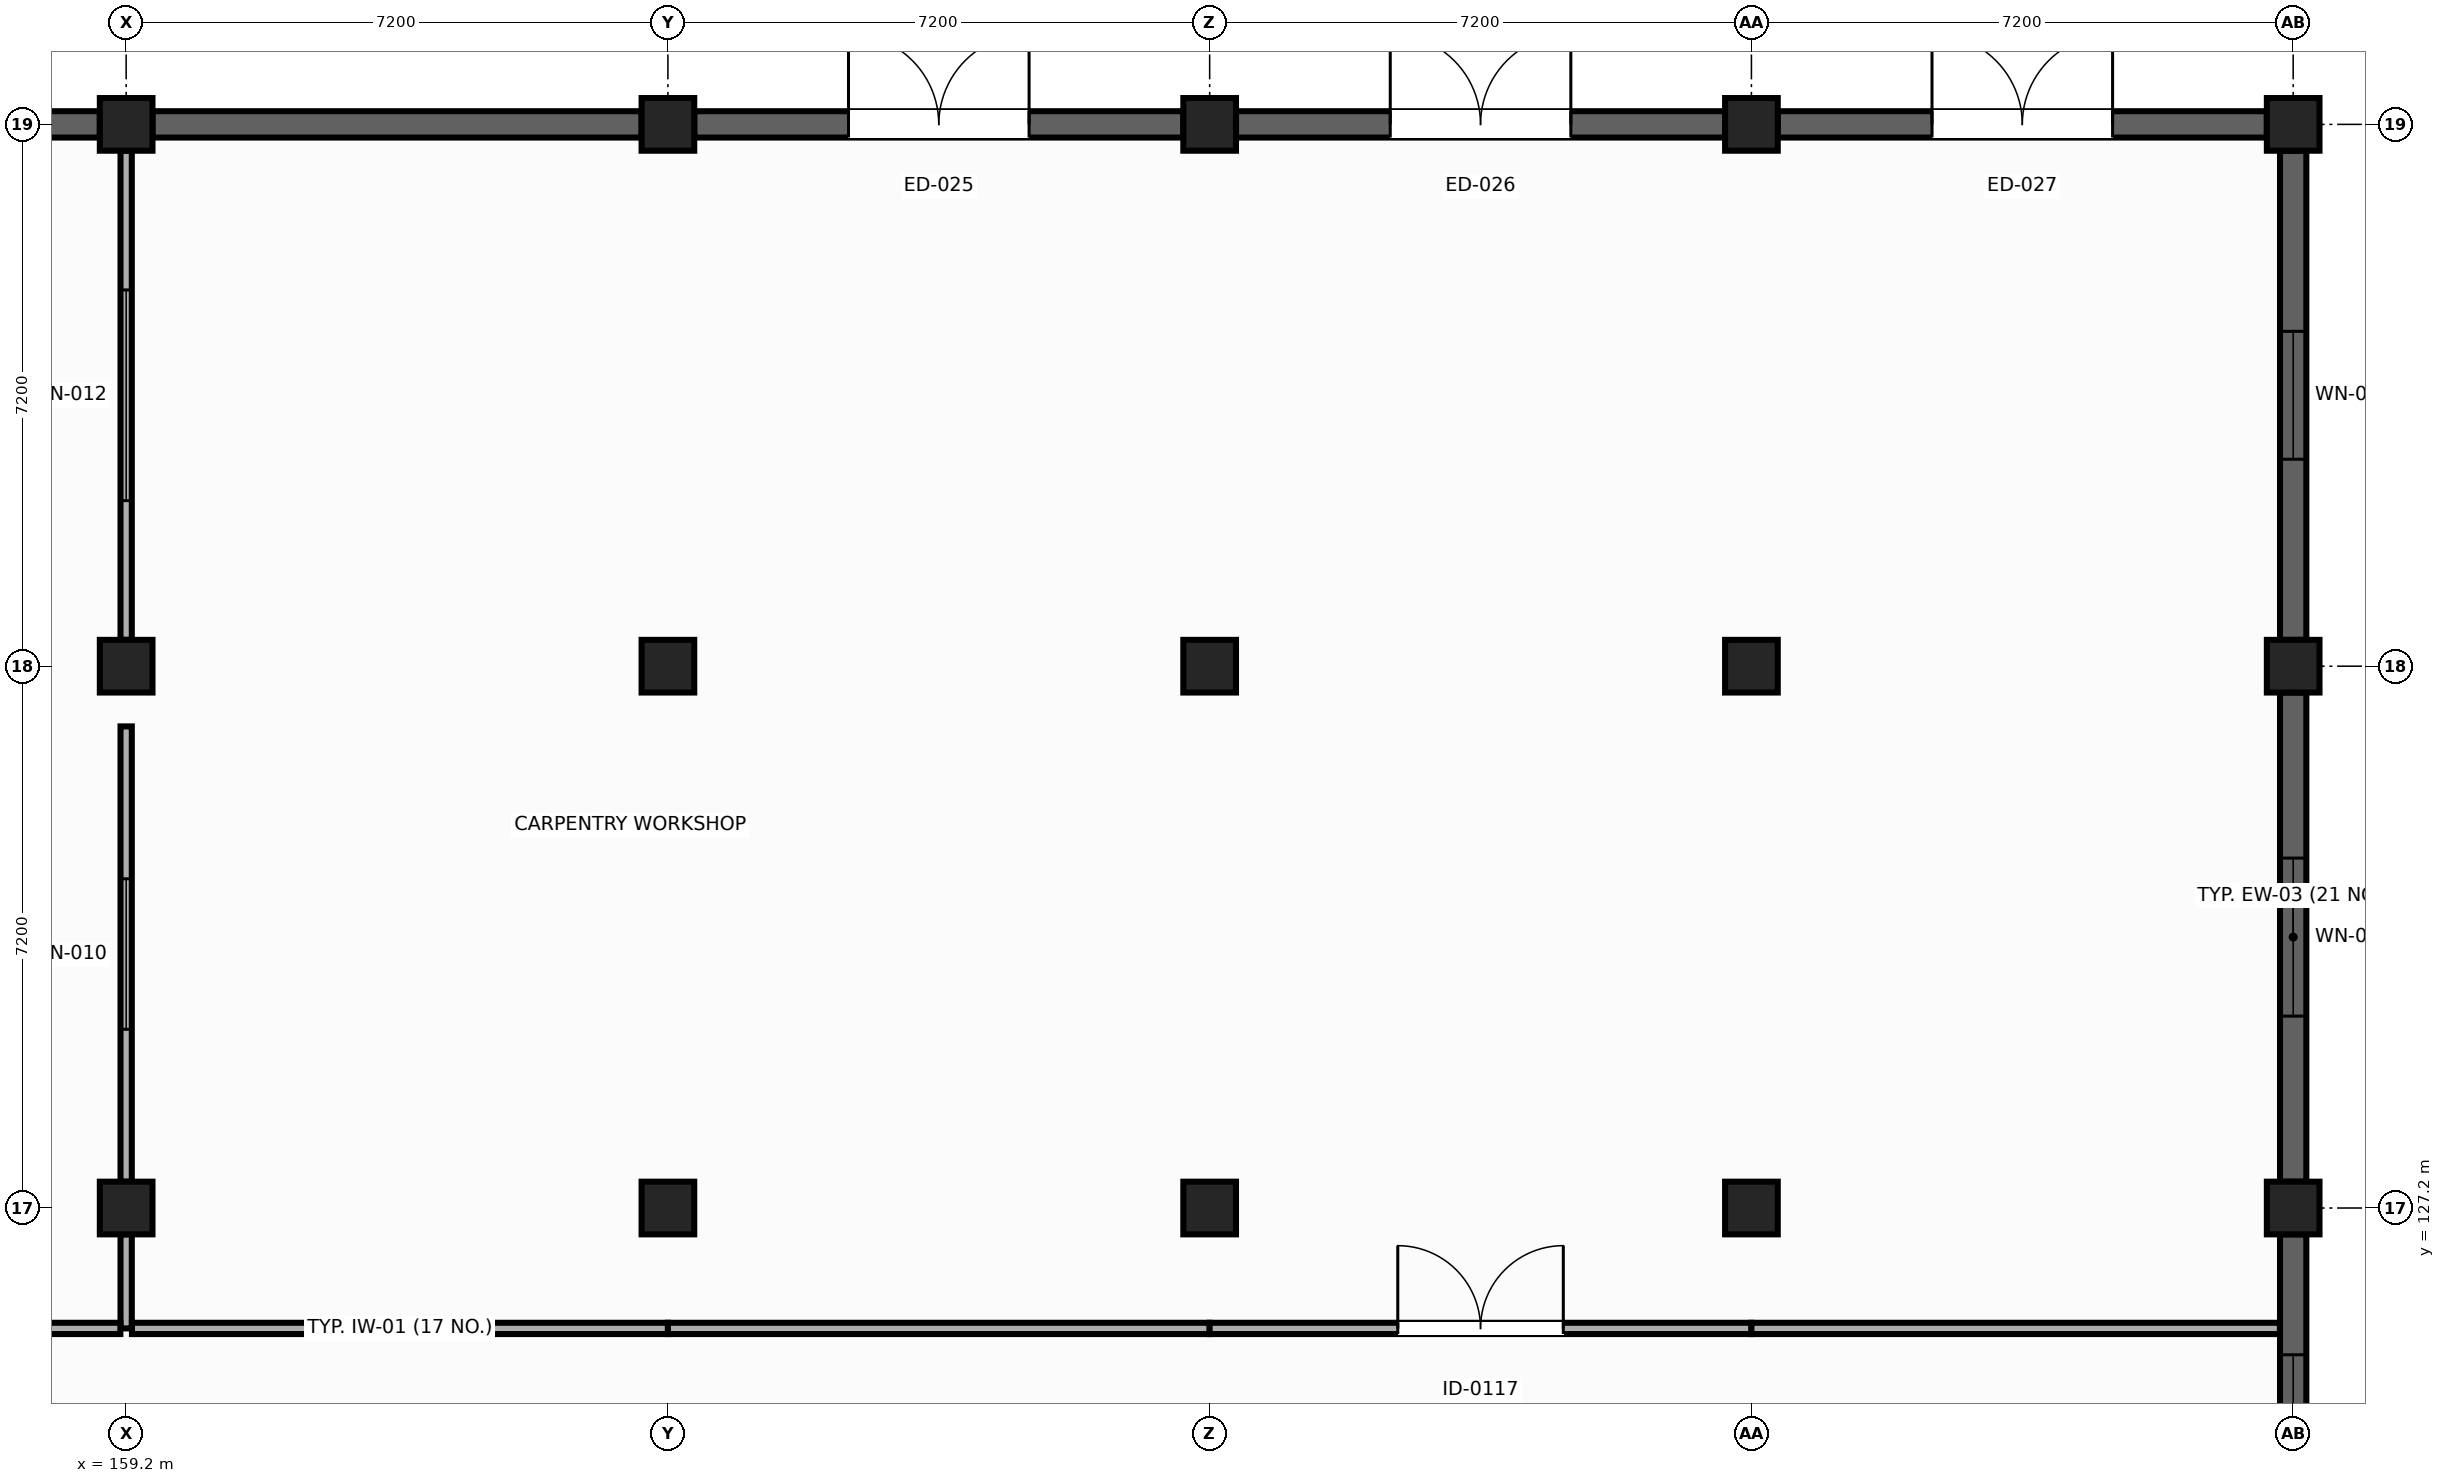
"""IFC4 building model, lengths in metres.
Left out: names, types, materials, properties, quantities, classifications, styles, units other than length and angle.
Written with IfcOpenShell. Run it as: python <this file> out.ifc"""

import sys

from ifc_helpers import new_model, si_unit, direction, frame, frame_2d, origin, origin_2d, place, context, subcontext, project, spatial, rectangle, extrude, element, fill, save


model = new_model("IFC4")
c1 = context("Model", 3, precision=1e-05, world=origin(), true_north=direction((0.0, 1.0)))
c2 = subcontext(c1, "Body", "Model", "MODEL_VIEW")
j1 = project(units=[si_unit("LENGTHUNIT", "METRE"), si_unit("PLANEANGLEUNIT", "RADIAN")], contexts=[c1])
p1 = place(None, origin())
s1 = spatial("IfcSite", under=j1, at=p1, CompositionType="ELEMENT")
p2 = place(p1, origin())
s2 = spatial("IfcBuilding", under=s1, at=p2, CompositionType="ELEMENT")
p3 = place(p2, origin())
s3 = spatial("IfcBuildingStorey", under=s2, at=p3, CompositionType="ELEMENT", Elevation=0.0)
for number, where, z_axis, x_axis in (
    (1, (159.2, 127.2, 0.0), (0.0, 0.0, 1.0), (1.0, 0.0, 0.0)),
    (2, (166.4, 127.2, 0.0), (0.0, 0.0, 1.0), (0.0, 1.0, 0.0)),
    (3, (173.6, 127.2, 0.0), (0.0, 0.0, 1.0), (1.0, 0.0, 0.0)),
    (4, (180.8, 127.2, 0.0), (0.0, 0.0, 1.0), (1.0, 0.0, 0.0)),
    (5, (188.0, 127.2, 0.0), (0.0, 0.0, 1.0), (0.0, 1.0, 0.0)),
    (6, (159.2, 134.4, 0.0), (0.0, 0.0, 1.0), (0.0, 1.0, 0.0)),
    (7, (166.4, 134.4, 0.0), (0.0, 0.0, 1.0), (1.0, 0.0, 0.0)),
    (8, (173.6, 134.4, 0.0), (0.0, 0.0, 1.0), (1.0, 0.0, 0.0)),
    (9, (180.8, 134.4, 0.0), (0.0, 0.0, 1.0), (0.0, 1.0, 0.0)),
    (10, (188.0, 134.4, 0.0), (0.0, 0.0, 1.0), (1.0, 0.0, 0.0)),
    (11, (159.2, 141.6, 0.0), (0.0, 0.0, 1.0), (1.0, 0.0, 0.0)),
    (12, (166.4, 141.6, 0.0), (0.0, 0.0, 1.0), (1.0, 0.0, 0.0)),
    (13, (173.6, 141.6, 0.0), (0.0, 0.0, 1.0), (0.0, 1.0, 0.0)),
    (14, (180.8, 141.6, 0.0), (0.0, 0.0, 1.0), (1.0, 0.0, 0.0)),
    (15, (188.0, 141.6, 0.0), (0.0, 0.0, 1.0), (0.0, 1.0, 0.0)),
):
    element("IfcColumn", number, at=place(p3, frame(where, z_axis=z_axis, x_axis=x_axis)), inside=s3, PredefinedType="COLUMN", context=c2, shape_type="SweptSolid", body=[
        extrude(rectangle(XDim=0.7, YDim=0.7, at=origin_2d()), origin(), (0.0, 0.0, 1.0), 5.4),
    ])
p4 = place(p3, frame((152.35, 141.6, 0.0), z_axis=(0.0, 0.0, 1.0), x_axis=(1.0, 0.0, 0.0)))
e16 = element("IfcWall", 16, at=p4, inside=s3, PredefinedType="SOLIDWALL", context=c2, shape_type="SweptSolid", body=[
    extrude(rectangle(XDim=6.5, YDim=0.35, at=frame_2d((3.25, 0.0))), origin(), (0.0, 0.0, 1.0), 5.12),
])
p5 = place(p4, frame((2.0, 0.0, 0.9)))
e17 = element("IfcOpeningElement", 17, at=p5, cuts=e16, PredefinedType="OPENING", context=c2, shape_type="SweptSolid", body=[
    extrude(rectangle(XDim=1.3, YDim=1.6, at=frame_2d((0.65, 0.8))), frame((0.0, 0.185, 0.0), z_axis=(0.0, -1.0, 0.0), x_axis=(1.0, 0.0, 0.0)), (0.0, 0.0, 1.0), 0.37),
])
p6 = place(p3, frame((159.55, 141.6, 0.0), z_axis=(0.0, 0.0, 1.0), x_axis=(1.0, 0.0, 0.0)))
e18 = element("IfcWall", 18, at=p6, inside=s3, PredefinedType="SOLIDWALL", context=c2, shape_type="SweptSolid", body=[
    extrude(rectangle(XDim=6.5, YDim=0.35, at=frame_2d((3.25, 0.0))), origin(), (0.0, 0.0, 1.0), 5.12),
])
p7 = place(p3, frame((166.75, 141.6, 0.0), z_axis=(0.0, 0.0, 1.0), x_axis=(1.0, 0.0, 0.0)))
e19 = element("IfcWall", 19, at=p7, inside=s3, PredefinedType="SOLIDWALL", context=c2, shape_type="SweptSolid", body=[
    extrude(rectangle(XDim=6.5, YDim=0.35, at=frame_2d((3.25, 0.0))), origin(), (0.0, 0.0, 1.0), 5.12),
])
p8 = place(p7, frame((2.05, 0.0, 0.0)))
e20 = element("IfcOpeningElement", 20, at=p8, cuts=e19, PredefinedType="OPENING", context=c2, shape_type="SweptSolid", body=[
    extrude(rectangle(XDim=2.4, YDim=2.7, at=frame_2d((1.2, 1.35))), frame((0.0, 0.185, 0.0), z_axis=(0.0, -1.0, 0.0), x_axis=(1.0, 0.0, 0.0)), (0.0, 0.0, 1.0), 0.37),
])
p9 = place(p3, frame((173.95, 141.6, 0.0), z_axis=(0.0, 0.0, 1.0), x_axis=(1.0, 0.0, 0.0)))
e21 = element("IfcWall", 21, at=p9, inside=s3, PredefinedType="SOLIDWALL", context=c2, shape_type="SweptSolid", body=[
    extrude(rectangle(XDim=6.5, YDim=0.35, at=frame_2d((3.25, 0.0))), origin(), (0.0, 0.0, 1.0), 5.12),
])
p10 = place(p9, frame((2.05, 0.0, 0.0)))
e22 = element("IfcOpeningElement", 22, at=p10, cuts=e21, PredefinedType="OPENING", context=c2, shape_type="SweptSolid", body=[
    extrude(rectangle(XDim=2.4, YDim=2.7, at=frame_2d((1.2, 1.35))), frame((0.0, 0.185, 0.0), z_axis=(0.0, -1.0, 0.0), x_axis=(1.0, 0.0, 0.0)), (0.0, 0.0, 1.0), 0.37),
])
p11 = place(p3, frame((181.15, 141.6, 0.0), z_axis=(0.0, 0.0, 1.0), x_axis=(1.0, 0.0, 0.0)))
e23 = element("IfcWall", 23, at=p11, inside=s3, PredefinedType="SOLIDWALL", context=c2, shape_type="SweptSolid", body=[
    extrude(rectangle(XDim=6.5, YDim=0.35, at=frame_2d((3.25, 0.0))), origin(), (0.0, 0.0, 1.0), 5.12),
])
p12 = place(p11, frame((2.05, 0.0, 0.0)))
e24 = element("IfcOpeningElement", 24, at=p12, cuts=e23, PredefinedType="OPENING", context=c2, shape_type="SweptSolid", body=[
    extrude(rectangle(XDim=2.4, YDim=2.7, at=frame_2d((1.2, 1.35))), frame((0.0, 0.185, 0.0), z_axis=(0.0, -1.0, 0.0), x_axis=(1.0, 0.0, 0.0)), (0.0, 0.0, 1.0), 0.37),
])
p13 = place(p3, frame((188.0, 141.25, 0.0), z_axis=(0.0, 0.0, 1.0), x_axis=(0.0, -1.0, 0.0)))
e25 = element("IfcWall", 25, at=p13, inside=s3, PredefinedType="SOLIDWALL", context=c2, shape_type="SweptSolid", body=[
    extrude(rectangle(XDim=6.5, YDim=0.35, at=frame_2d((3.25, 0.0))), origin(), (0.0, 0.0, 1.0), 5.12),
])
p14 = place(p13, frame((2.4, 0.0, 0.9)))
e26 = element("IfcOpeningElement", 26, at=p14, cuts=e25, PredefinedType="OPENING", context=c2, shape_type="SweptSolid", body=[
    extrude(rectangle(XDim=1.7, YDim=1.6, at=frame_2d((0.85, 0.8))), frame((0.0, 0.185, 0.0), z_axis=(0.0, -1.0, 0.0), x_axis=(1.0, 0.0, 0.0)), (0.0, 0.0, 1.0), 0.37),
])
p15 = place(p3, frame((188.0, 134.05, 0.0), z_axis=(0.0, 0.0, 1.0), x_axis=(0.0, -1.0, 0.0)))
e27 = element("IfcWall", 27, at=p15, inside=s3, PredefinedType="SOLIDWALL", context=c2, shape_type="SweptSolid", body=[
    extrude(rectangle(XDim=6.5, YDim=0.35, at=frame_2d((3.25, 0.0))), origin(), (0.0, 0.0, 1.0), 5.12),
])
p16 = place(p15, frame((2.2, 0.0, 0.9)))
e28 = element("IfcOpeningElement", 28, at=p16, cuts=e27, PredefinedType="OPENING", context=c2, shape_type="SweptSolid", body=[
    extrude(rectangle(XDim=2.1, YDim=1.6, at=frame_2d((1.05, 0.8))), frame((0.0, 0.185, 0.0), z_axis=(0.0, -1.0, 0.0), x_axis=(1.0, 0.0, 0.0)), (0.0, 0.0, 1.0), 0.37),
])
p17 = place(p3, frame((188.0, 126.85, 0.0), z_axis=(0.0, 0.0, 1.0), x_axis=(0.0, -1.0, 0.0)))
e29 = element("IfcWall", 29, at=p17, inside=s3, PredefinedType="SOLIDWALL", context=c2, shape_type="SweptSolid", body=[
    extrude(rectangle(XDim=6.5, YDim=0.35, at=frame_2d((3.25, 0.0))), origin(), (0.0, 0.0, 1.0), 5.12),
])
p18 = place(p17, frame((1.6, 0.0, 0.9)))
e30 = element("IfcOpeningElement", 30, at=p18, cuts=e29, PredefinedType="OPENING", context=c2, shape_type="SweptSolid", body=[
    extrude(rectangle(XDim=2.5, YDim=1.6, at=frame_2d((1.25, 0.8))), frame((0.0, 0.185, 0.0), z_axis=(0.0, -1.0, 0.0), x_axis=(1.0, 0.0, 0.0)), (0.0, 0.0, 1.0), 0.37),
])
p19 = place(p3, frame((159.2, 127.55, 0.0), z_axis=(0.0, 0.0, 1.0), x_axis=(0.0, 1.0, 0.0)))
e31 = element("IfcWall", 31, at=p19, inside=s3, PredefinedType="PARTITIONING", context=c2, shape_type="SweptSolid", body=[
    extrude(rectangle(XDim=6.05, YDim=0.15, at=frame_2d((3.025, 0.0))), origin(), (0.0, 0.0, 1.0), 4.315),
])
p20 = place(p19, frame((2.025, 0.0, 1.1)))
e32 = element("IfcOpeningElement", 32, at=p20, cuts=e31, PredefinedType="OPENING", context=c2, shape_type="SweptSolid", body=[
    extrude(rectangle(XDim=2.0, YDim=1.1, at=frame_2d((1.0, 0.55))), frame((0.0, 0.085, 0.0), z_axis=(0.0, -1.0, 0.0), x_axis=(1.0, 0.0, 0.0)), (0.0, 0.0, 1.0), 0.17),
])
p21 = place(p3, frame((159.2, 125.6, 0.0), z_axis=(0.0, 0.0, 1.0), x_axis=(0.0, 1.0, 0.0)))
e33 = element("IfcWall", 33, at=p21, inside=s3, PredefinedType="PARTITIONING", context=c2, shape_type="SweptSolid", body=[
    extrude(rectangle(XDim=1.25, YDim=0.15, at=frame_2d((0.625, 0.0))), origin(), (0.0, 0.0, 1.0), 4.315),
])
p22 = place(p3, frame((159.2, 134.75, 0.0), z_axis=(0.0, 0.0, 1.0), x_axis=(0.0, 1.0, 0.0)))
e34 = element("IfcWall", 34, at=p22, inside=s3, PredefinedType="PARTITIONING", context=c2, shape_type="SweptSolid", body=[
    extrude(rectangle(XDim=6.5, YDim=0.15, at=frame_2d((3.25, 0.0))), origin(), (0.0, 0.0, 1.0), 4.315),
])
p23 = place(p22, frame((1.85, 0.0, 1.1)))
e35 = element("IfcOpeningElement", 35, at=p23, cuts=e34, PredefinedType="OPENING", context=c2, shape_type="SweptSolid", body=[
    extrude(rectangle(XDim=2.8, YDim=1.1, at=frame_2d((1.4, 0.55))), frame((0.0, 0.085, 0.0), z_axis=(0.0, -1.0, 0.0), x_axis=(1.0, 0.0, 0.0)), (0.0, 0.0, 1.0), 0.17),
])
p24 = place(p3, frame((152.0, 125.6, 0.0), z_axis=(0.0, 0.0, 1.0), x_axis=(1.0, 0.0, 0.0)))
e36 = element("IfcWall", 36, at=p24, inside=s3, PredefinedType="PARTITIONING", context=c2, shape_type="SweptSolid", body=[
    extrude(rectangle(XDim=7.123, YDim=0.15, at=frame_2d((3.562, 0.0))), origin(), (0.0, 0.0, 1.0), 4.315),
])
p25 = place(p3, frame((159.277, 125.6, 0.0), z_axis=(0.0, 0.0, 1.0), x_axis=(1.0, 0.0, 0.0)))
e37 = element("IfcWall", 37, at=p25, inside=s3, PredefinedType="PARTITIONING", context=c2, shape_type="SweptSolid", body=[
    extrude(rectangle(XDim=7.123, YDim=0.15, at=frame_2d((3.562, 0.0))), origin(), (0.0, 0.0, 1.0), 4.315),
])
p26 = place(p3, frame((166.4, 125.6, 0.0), z_axis=(0.0, 0.0, 1.0), x_axis=(1.0, 0.0, 0.0)))
e38 = element("IfcWall", 38, at=p26, inside=s3, PredefinedType="PARTITIONING", context=c2, shape_type="SweptSolid", body=[
    extrude(rectangle(XDim=7.2, YDim=0.15, at=frame_2d((3.6, 0.0))), origin(), (0.0, 0.0, 1.0), 4.315),
])
p27 = place(p3, frame((173.6, 125.6, 0.0), z_axis=(0.0, 0.0, 1.0), x_axis=(1.0, 0.0, 0.0)))
e39 = element("IfcWall", 39, at=p27, inside=s3, PredefinedType="PARTITIONING", context=c2, shape_type="SweptSolid", body=[
    extrude(rectangle(XDim=7.2, YDim=0.15, at=frame_2d((3.6, 0.0))), origin(), (0.0, 0.0, 1.0), 4.315),
])
p28 = place(p27, frame((2.5, 0.0, 0.0)))
e40 = element("IfcOpeningElement", 40, at=p28, cuts=e39, PredefinedType="OPENING", context=c2, shape_type="SweptSolid", body=[
    extrude(rectangle(XDim=2.2, YDim=2.6, at=frame_2d((1.1, 1.3))), frame((0.0, 0.085, 0.0), z_axis=(0.0, -1.0, 0.0), x_axis=(1.0, 0.0, 0.0)), (0.0, 0.0, 1.0), 0.17),
])
p29 = place(p3, frame((180.8, 125.6, 0.0), z_axis=(0.0, 0.0, 1.0), x_axis=(1.0, 0.0, 0.0)))
e41 = element("IfcWall", 41, at=p29, inside=s3, PredefinedType="PARTITIONING", context=c2, shape_type="SweptSolid", body=[
    extrude(rectangle(XDim=7.023, YDim=0.15, at=frame_2d((3.511, 0.0))), origin(), (0.0, 0.0, 1.0), 4.315),
])
p30 = place(p8, origin())
e42 = element("IfcDoor", 42, at=p30, inside=s3, OperationType="DOUBLE_DOOR_SINGLE_SWING", PredefinedType="DOOR", context=c2, shape_type="SweptSolid", body=[
    extrude(rectangle(XDim=2.4, YDim=2.7, at=frame_2d((1.2, 1.35))), frame((0.0, 0.025, 0.0), z_axis=(0.0, -1.0, 0.0), x_axis=(1.0, 0.0, 0.0)), (0.0, 0.0, 1.0), 0.05),
])
fill(e20, e42)
p31 = place(p10, origin())
e43 = element("IfcDoor", 43, at=p31, inside=s3, OperationType="DOUBLE_DOOR_SINGLE_SWING", PredefinedType="DOOR", context=c2, shape_type="SweptSolid", body=[
    extrude(rectangle(XDim=2.4, YDim=2.7, at=frame_2d((1.2, 1.35))), frame((0.0, 0.025, 0.0), z_axis=(0.0, -1.0, 0.0), x_axis=(1.0, 0.0, 0.0)), (0.0, 0.0, 1.0), 0.05),
])
fill(e22, e43)
p32 = place(p12, origin())
e44 = element("IfcDoor", 44, at=p32, inside=s3, OperationType="DOUBLE_DOOR_SINGLE_SWING", PredefinedType="DOOR", context=c2, shape_type="SweptSolid", body=[
    extrude(rectangle(XDim=2.4, YDim=2.7, at=frame_2d((1.2, 1.35))), frame((0.0, 0.025, 0.0), z_axis=(0.0, -1.0, 0.0), x_axis=(1.0, 0.0, 0.0)), (0.0, 0.0, 1.0), 0.05),
])
fill(e24, e44)
p33 = place(p14, origin())
e45 = element("IfcWindow", 45, at=p33, inside=s3, PartitioningType="SINGLE_PANEL", PredefinedType="WINDOW", context=c2, shape_type="SweptSolid", body=[
    extrude(rectangle(XDim=1.7, YDim=1.6, at=frame_2d((0.85, 0.8))), frame((0.0, 0.03, 0.0), z_axis=(0.0, -1.0, 0.0), x_axis=(1.0, 0.0, 0.0)), (0.0, 0.0, 1.0), 0.06),
])
fill(e26, e45)
p34 = place(p16, origin())
e46 = element("IfcWindow", 46, at=p34, inside=s3, PartitioningType="SINGLE_PANEL", PredefinedType="WINDOW", context=c2, shape_type="SweptSolid", body=[
    extrude(rectangle(XDim=2.1, YDim=1.6, at=frame_2d((1.05, 0.8))), frame((0.0, 0.03, 0.0), z_axis=(0.0, -1.0, 0.0), x_axis=(1.0, 0.0, 0.0)), (0.0, 0.0, 1.0), 0.06),
])
fill(e28, e46)
p35 = place(p18, origin())
e47 = element("IfcWindow", 47, at=p35, inside=s3, PartitioningType="SINGLE_PANEL", PredefinedType="WINDOW", context=c2, shape_type="SweptSolid", body=[
    extrude(rectangle(XDim=2.5, YDim=1.6, at=frame_2d((1.25, 0.8))), frame((0.0, 0.03, 0.0), z_axis=(0.0, -1.0, 0.0), x_axis=(1.0, 0.0, 0.0)), (0.0, 0.0, 1.0), 0.06),
])
fill(e30, e47)
p36 = place(p20, origin())
e48 = element("IfcWindow", 48, at=p36, inside=s3, PartitioningType="SINGLE_PANEL", PredefinedType="WINDOW", context=c2, shape_type="SweptSolid", body=[
    extrude(rectangle(XDim=2.0, YDim=1.1, at=frame_2d((1.0, 0.55))), frame((0.0, 0.03, 0.0), z_axis=(0.0, -1.0, 0.0), x_axis=(1.0, 0.0, 0.0)), (0.0, 0.0, 1.0), 0.06),
])
fill(e32, e48)
p37 = place(p28, origin())
e49 = element("IfcDoor", 49, at=p37, inside=s3, OperationType="DOUBLE_DOOR_SINGLE_SWING", PredefinedType="DOOR", context=c2, shape_type="SweptSolid", body=[
    extrude(rectangle(XDim=2.2, YDim=2.6, at=frame_2d((1.1, 1.3))), frame((0.0, 0.025, 0.0), z_axis=(0.0, -1.0, 0.0), x_axis=(1.0, 0.0, 0.0)), (0.0, 0.0, 1.0), 0.05),
])
fill(e40, e49)
p38 = place(p23, origin())
e50 = element("IfcWindow", 50, at=p38, inside=s3, PartitioningType="SINGLE_PANEL", PredefinedType="WINDOW", context=c2, shape_type="SweptSolid", body=[
    extrude(rectangle(XDim=2.8, YDim=1.1, at=frame_2d((1.4, 0.55))), frame((0.0, 0.03, 0.0), z_axis=(0.0, -1.0, 0.0), x_axis=(1.0, 0.0, 0.0)), (0.0, 0.0, 1.0), 0.06),
])
fill(e35, e50)
save(model, sys.argv[1])
